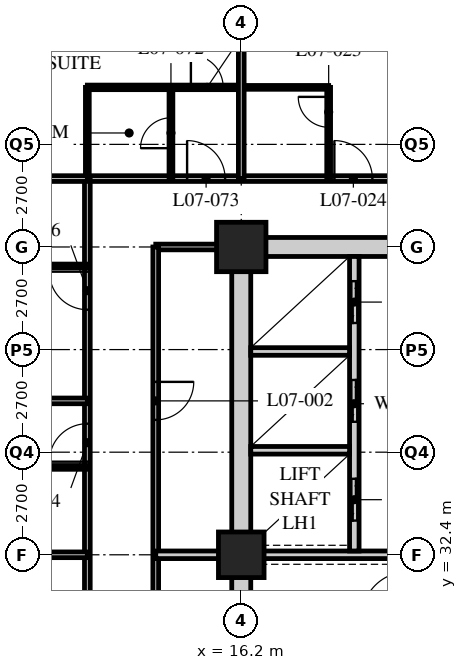
"""IFC4 building model, lengths in metres.
Left out: names, types, materials, properties, quantities, classifications, styles, units other than length and angle.
Written with IfcOpenShell. Run it as: python <this file> out.ifc"""

import sys

from ifc_helpers import new_model, si_unit, direction, frame, frame_2d, origin, origin_2d, place, context, subcontext, project, spatial, rectangle, hollow_rectangle, extrude, element, fill, save


model = new_model("IFC4")
c1 = context("Model", 3, precision=1e-05, world=origin(), true_north=direction((0.0, 1.0)))
c2 = subcontext(c1, "Body", "Model", "MODEL_VIEW")
j1 = project(units=[si_unit("LENGTHUNIT", "METRE"), si_unit("PLANEANGLEUNIT", "RADIAN")], contexts=[c1])
p1 = place(None, origin())
s1 = spatial("IfcSite", under=j1, at=p1, CompositionType="ELEMENT")
p2 = place(p1, origin())
s2 = spatial("IfcBuilding", under=s1, at=p2, CompositionType="ELEMENT")
p3 = place(p2, frame((0.0, 0.0, 36.4)))
s3 = spatial("IfcBuildingStorey", under=s2, at=p3, CompositionType="ELEMENT", Elevation=36.4)
p4 = place(p3, frame((16.2, 32.4, 0.0), z_axis=(0.0, 0.0, 1.0), x_axis=(1.0, 0.0, 0.0)))
e1 = element("IfcColumn", 1, at=p4, inside=s3, PredefinedType="COLUMN", context=c2, shape_type="SweptSolid", body=[
    extrude(hollow_rectangle(XDim=1.2, YDim=1.2, WallThickness=0.12, at=origin_2d()), origin(), (0.0, 0.0, 1.0), 3.4),
])
p5 = place(p3, frame((16.2, 40.5, 0.0), z_axis=(0.0, 0.0, 1.0), x_axis=(1.0, 0.0, 0.0)))
e2 = element("IfcColumn", 2, at=p5, inside=s3, PredefinedType="COLUMN", context=c2, shape_type="SweptSolid", body=[
    extrude(hollow_rectangle(XDim=1.3, YDim=1.3, WallThickness=0.13, at=origin_2d()), origin(), (0.0, 0.0, 1.0), 3.4),
])
p6 = place(p3, frame((12.15, 42.3, 0.0), z_axis=(0.0, 0.0, 1.0), x_axis=(1.0, 0.0, 0.0)))
e3 = element("IfcWall", 3, at=p6, inside=s3, PredefinedType="PARTITIONING", context=c2, shape_type="SweptSolid", body=[
    extrude(rectangle(XDim=32.4, YDim=0.15, at=frame_2d((16.2, 0.0))), origin(), (0.0, 0.0, 1.0), 3.19),
])
p7 = place(p6, frame((6.5, 0.0, 0.0)))
e4 = element("IfcOpeningElement", 4, at=p7, cuts=e3, PredefinedType="OPENING", context=c2, shape_type="SweptSolid", body=[
    extrude(rectangle(XDim=1.0, YDim=2.1, at=frame_2d((0.5, 1.05))), frame((0.0, 0.085, 0.0), z_axis=(0.0, -1.0, 0.0), x_axis=(1.0, 0.0, 0.0)), (0.0, 0.0, 1.0), 0.17),
])
p8 = place(p6, frame((8.4, 0.0, 0.0)))
e5 = element("IfcOpeningElement", 5, at=p8, cuts=e3, PredefinedType="OPENING", context=c2, shape_type="SweptSolid", body=[
    extrude(rectangle(XDim=1.0, YDim=2.1, at=frame_2d((0.5, 1.05))), frame((0.0, 0.085, 0.0), z_axis=(0.0, -1.0, 0.0), x_axis=(1.0, 0.0, 0.0)), (0.0, 0.0, 1.0), 0.17),
])
p9 = place(p6, frame((14.6, 0.0, 0.0)))
e6 = element("IfcOpeningElement", 6, at=p9, cuts=e3, PredefinedType="OPENING", context=c2, shape_type="SweptSolid", body=[
    extrude(rectangle(XDim=1.0, YDim=2.1, at=frame_2d((0.5, 1.05))), frame((0.0, 0.085, 0.0), z_axis=(0.0, -1.0, 0.0), x_axis=(1.0, 0.0, 0.0)), (0.0, 0.0, 1.0), 0.17),
])
p10 = place(p6, frame((18.65, 0.0, 0.0)))
e7 = element("IfcOpeningElement", 7, at=p10, cuts=e3, PredefinedType="OPENING", context=c2, shape_type="SweptSolid", body=[
    extrude(rectangle(XDim=1.0, YDim=2.1, at=frame_2d((0.5, 1.05))), frame((0.0, 0.085, 0.0), z_axis=(0.0, -1.0, 0.0), x_axis=(1.0, 0.0, 0.0)), (0.0, 0.0, 1.0), 0.17),
])
p11 = place(p6, frame((23.0, 0.0, 0.0)))
e8 = element("IfcOpeningElement", 8, at=p11, cuts=e3, PredefinedType="OPENING", context=c2, shape_type="SweptSolid", body=[
    extrude(rectangle(XDim=1.0, YDim=2.1, at=frame_2d((0.5, 1.05))), frame((0.0, 0.085, 0.0), z_axis=(0.0, -1.0, 0.0), x_axis=(1.0, 0.0, 0.0)), (0.0, 0.0, 1.0), 0.17),
])
p12 = place(p6, frame((26.75, 0.0, 0.0)))
e9 = element("IfcOpeningElement", 9, at=p12, cuts=e3, PredefinedType="OPENING", context=c2, shape_type="SweptSolid", body=[
    extrude(rectangle(XDim=1.0, YDim=2.1, at=frame_2d((0.5, 1.05))), frame((0.0, 0.085, 0.0), z_axis=(0.0, -1.0, 0.0), x_axis=(1.0, 0.0, 0.0)), (0.0, 0.0, 1.0), 0.17),
])
p13 = place(p6, frame((28.775, 0.0, 0.0)))
e10 = element("IfcOpeningElement", 10, at=p13, cuts=e3, PredefinedType="OPENING", context=c2, shape_type="SweptSolid", body=[
    extrude(rectangle(XDim=1.0, YDim=2.1, at=frame_2d((0.5, 1.05))), frame((0.0, 0.085, 0.0), z_axis=(0.0, -1.0, 0.0), x_axis=(1.0, 0.0, 0.0)), (0.0, 0.0, 1.0), 0.17),
])
p14 = place(p6, frame((2.625, 0.0, 0.0)))
e11 = element("IfcOpeningElement", 11, at=p14, cuts=e3, PredefinedType="OPENING", context=c2, shape_type="SweptSolid", body=[
    extrude(rectangle(XDim=1.0, YDim=2.1, at=frame_2d((0.5, 1.05))), frame((0.0, 0.085, 0.0), z_axis=(0.0, -1.0, 0.0), x_axis=(1.0, 0.0, 0.0)), (0.0, 0.0, 1.0), 0.17),
])
p15 = place(p3, frame((12.15, 16.2, 0.0), z_axis=(0.0, 0.0, 1.0), x_axis=(0.0, 1.0, 0.0)))
e12 = element("IfcWall", 12, at=p15, inside=s3, PredefinedType="PARTITIONING", context=c2, shape_type="SweptSolid", body=[
    extrude(rectangle(XDim=26.1, YDim=0.15, at=frame_2d((13.05, 0.0))), origin(), (0.0, 0.0, 1.0), 3.19),
])
p16 = place(p15, frame((2.75, 0.0, 0.0)))
e13 = element("IfcOpeningElement", 13, at=p16, cuts=e12, PredefinedType="OPENING", context=c2, shape_type="SweptSolid", body=[
    extrude(rectangle(XDim=1.0, YDim=2.1, at=frame_2d((0.5, 1.05))), frame((0.0, 0.085, 0.0), z_axis=(0.0, -1.0, 0.0), x_axis=(1.0, 0.0, 0.0)), (0.0, 0.0, 1.0), 0.17),
])
p17 = place(p15, frame((4.35, 0.0, 0.0)))
e14 = element("IfcOpeningElement", 14, at=p17, cuts=e12, PredefinedType="OPENING", context=c2, shape_type="SweptSolid", body=[
    extrude(rectangle(XDim=1.0, YDim=2.1, at=frame_2d((0.5, 1.05))), frame((0.0, 0.085, 0.0), z_axis=(0.0, -1.0, 0.0), x_axis=(1.0, 0.0, 0.0)), (0.0, 0.0, 1.0), 0.17),
])
p18 = place(p15, frame((10.55, 0.0, 0.0)))
e15 = element("IfcOpeningElement", 15, at=p18, cuts=e12, PredefinedType="OPENING", context=c2, shape_type="SweptSolid", body=[
    extrude(rectangle(XDim=1.0, YDim=2.1, at=frame_2d((0.5, 1.05))), frame((0.0, 0.085, 0.0), z_axis=(0.0, -1.0, 0.0), x_axis=(1.0, 0.0, 0.0)), (0.0, 0.0, 1.0), 0.17),
])
p19 = place(p15, frame((12.45, 0.0, 0.0)))
e16 = element("IfcOpeningElement", 16, at=p19, cuts=e12, PredefinedType="OPENING", context=c2, shape_type="SweptSolid", body=[
    extrude(rectangle(XDim=1.0, YDim=2.1, at=frame_2d((0.5, 1.05))), frame((0.0, 0.085, 0.0), z_axis=(0.0, -1.0, 0.0), x_axis=(1.0, 0.0, 0.0)), (0.0, 0.0, 1.0), 0.17),
])
p20 = place(p15, frame((18.65, 0.0, 0.0)))
e17 = element("IfcOpeningElement", 17, at=p20, cuts=e12, PredefinedType="OPENING", context=c2, shape_type="SweptSolid", body=[
    extrude(rectangle(XDim=1.0, YDim=2.1, at=frame_2d((0.5, 1.05))), frame((0.0, 0.085, 0.0), z_axis=(0.0, -1.0, 0.0), x_axis=(1.0, 0.0, 0.0)), (0.0, 0.0, 1.0), 0.17),
])
p21 = place(p15, frame((22.65, 0.0, 0.0)))
e18 = element("IfcOpeningElement", 18, at=p21, cuts=e12, PredefinedType="OPENING", context=c2, shape_type="SweptSolid", body=[
    extrude(rectangle(XDim=1.0, YDim=2.1, at=frame_2d((0.5, 1.05))), frame((0.0, 0.085, 0.0), z_axis=(0.0, -1.0, 0.0), x_axis=(1.0, 0.0, 0.0)), (0.0, 0.0, 1.0), 0.17),
])
p22 = place(p3, frame((16.0, 40.5, 0.0), z_axis=(0.0, 0.0, 1.0), x_axis=(-1.0, 0.0, 0.0)))
e19 = element("IfcWall", 19, at=p22, inside=s3, PredefinedType="PARTITIONING", context=c2, shape_type="SweptSolid", body=[
    extrude(rectangle(XDim=2.05, YDim=0.15, at=frame_2d((1.025, 0.0))), origin(), (0.0, 0.0, 1.0), 2.578),
])
p23 = place(p3, frame((13.95, 40.5, 0.0), z_axis=(0.0, 0.0, 1.0), x_axis=(0.0, -1.0, 0.0)))
e20 = element("IfcWall", 20, at=p23, inside=s3, PredefinedType="PARTITIONING", context=c2, shape_type="SweptSolid", body=[
    extrude(rectangle(XDim=22.5, YDim=0.15, at=frame_2d((11.25, 0.0))), origin(), (0.0, 0.0, 1.0), 3.19),
])
p24 = place(p23, frame((11.65, 0.0, 0.0)))
e21 = element("IfcOpeningElement", 21, at=p24, cuts=e20, PredefinedType="OPENING", context=c2, shape_type="SweptSolid", body=[
    extrude(rectangle(XDim=1.0, YDim=2.1, at=frame_2d((0.5, 1.05))), frame((0.0, 0.085, 0.0), z_axis=(0.0, -1.0, 0.0), x_axis=(1.0, 0.0, 0.0)), (0.0, 0.0, 1.0), 0.17),
])
p25 = place(p23, frame((3.55, 0.0, 0.0)))
e22 = element("IfcOpeningElement", 22, at=p25, cuts=e20, PredefinedType="OPENING", context=c2, shape_type="SweptSolid", body=[
    extrude(rectangle(XDim=1.0, YDim=2.1, at=frame_2d((0.5, 1.05))), frame((0.0, 0.085, 0.0), z_axis=(0.0, -1.0, 0.0), x_axis=(1.0, 0.0, 0.0)), (0.0, 0.0, 1.0), 0.17),
])
p26 = place(p3, frame((13.95, 32.4, 0.0), z_axis=(0.0, 0.0, 1.0), x_axis=(1.0, 0.0, 0.0)))
e23 = element("IfcWall", 23, at=p26, inside=s3, PredefinedType="SOLIDWALL", context=c2, shape_type="SweptSolid", body=[
    extrude(rectangle(XDim=2.25, YDim=0.2, at=frame_2d((1.125, 0.0))), origin(), (0.0, 0.0, 1.0), 2.578),
])
p27 = place(p3, frame((16.2, 44.7, 0.0), z_axis=(0.0, 0.0, 1.0), x_axis=(1.0, 0.0, 0.0)))
e24 = element("IfcWall", 24, at=p27, inside=s3, PredefinedType="PARTITIONING", context=c2, shape_type="SweptSolid", body=[
    extrude(rectangle(XDim=2.3, YDim=0.1, at=frame_2d((1.15, 0.0))), origin(), (0.0, 0.0, 1.0), 3.19),
])
p28 = place(p3, frame((18.5, 42.3, 0.0), z_axis=(0.0, 0.0, 1.0), x_axis=(0.0, 1.0, 0.0)))
e25 = element("IfcWall", 25, at=p28, inside=s3, PredefinedType="PARTITIONING", context=c2, shape_type="SweptSolid", body=[
    extrude(rectangle(XDim=2.4, YDim=0.1, at=frame_2d((1.2, 0.0))), origin(), (0.0, 0.0, 1.0), 3.19),
])
p29 = place(p28, frame((1.35, 0.0, 0.0)))
e26 = element("IfcOpeningElement", 26, at=p29, cuts=e25, PredefinedType="OPENING", context=c2, shape_type="SweptSolid", body=[
    extrude(rectangle(XDim=0.8, YDim=2.1, at=frame_2d((0.4, 1.05))), frame((0.0, 0.06, 0.0), z_axis=(0.0, -1.0, 0.0), x_axis=(1.0, 0.0, 0.0)), (0.0, 0.0, 1.0), 0.12),
])
p30 = place(p3, frame((12.15, 32.4, 0.0), z_axis=(0.0, 0.0, 1.0), x_axis=(-1.0, 0.0, 0.0)))
e27 = element("IfcWall", 27, at=p30, inside=s3, PredefinedType="PARTITIONING", context=c2, shape_type="SweptSolid", body=[
    extrude(rectangle(XDim=11.85, YDim=0.15, at=frame_2d((5.925, 0.0))), origin(), (0.0, 0.0, 1.0), 2.578),
])
p31 = place(p3, frame((12.15, 34.7, 0.0), z_axis=(0.0, 0.0, 1.0), x_axis=(-1.0, 0.0, 0.0)))
e28 = element("IfcWall", 28, at=p31, inside=s3, PredefinedType="PARTITIONING", context=c2, shape_type="SweptSolid", body=[
    extrude(rectangle(XDim=3.0, YDim=0.1, at=frame_2d((1.5, 0.0))), origin(), (0.0, 0.0, 1.0), 3.19),
])
p32 = place(p31, frame((1.95, 0.0, 0.0)))
e29 = element("IfcOpeningElement", 29, at=p32, cuts=e28, PredefinedType="OPENING", context=c2, shape_type="SweptSolid", body=[
    extrude(rectangle(XDim=0.8, YDim=2.1, at=frame_2d((0.4, 1.05))), frame((0.0, 0.06, 0.0), z_axis=(0.0, -1.0, 0.0), x_axis=(1.0, 0.0, 0.0)), (0.0, 0.0, 1.0), 0.12),
])
p33 = place(p3, frame((12.15, 36.45, 0.0), z_axis=(0.0, 0.0, 1.0), x_axis=(-1.0, 0.0, 0.0)))
e30 = element("IfcWall", 30, at=p33, inside=s3, PredefinedType="PARTITIONING", context=c2, shape_type="SweptSolid", body=[
    extrude(rectangle(XDim=11.85, YDim=0.15, at=frame_2d((5.925, 0.0))), origin(), (0.0, 0.0, 1.0), 3.19),
])
p34 = place(p3, frame((12.15, 40.0, 0.0), z_axis=(0.0, 0.0, 1.0), x_axis=(-1.0, 0.0, 0.0)))
e31 = element("IfcWall", 31, at=p34, inside=s3, PredefinedType="PARTITIONING", context=c2, shape_type="SweptSolid", body=[
    extrude(rectangle(XDim=3.515, YDim=0.1, at=frame_2d((1.757, 0.0))), origin(), (0.0, 0.0, 1.0), 3.19),
])
p35 = place(p34, frame((1.965, 0.0, 0.0)))
e32 = element("IfcOpeningElement", 32, at=p35, cuts=e31, PredefinedType="OPENING", context=c2, shape_type="SweptSolid", body=[
    extrude(rectangle(XDim=0.8, YDim=2.1, at=frame_2d((0.4, 1.05))), frame((0.0, 0.06, 0.0), z_axis=(0.0, -1.0, 0.0), x_axis=(1.0, 0.0, 0.0)), (0.0, 0.0, 1.0), 0.12),
])
p36 = place(p3, frame((12.15, 44.7, 0.0), z_axis=(0.0, 0.0, 1.0), x_axis=(1.0, 0.0, 0.0)))
e33 = element("IfcWall", 33, at=p36, inside=s3, PredefinedType="PARTITIONING", context=c2, shape_type="SweptSolid", body=[
    extrude(rectangle(XDim=4.05, YDim=0.12, at=frame_2d((2.025, 0.0))), origin(), (0.0, 0.0, 1.0), 3.19),
])
p37 = place(p36, frame((2.725, 0.0, 0.0)))
e34 = element("IfcOpeningElement", 34, at=p37, cuts=e33, PredefinedType="OPENING", context=c2, shape_type="SweptSolid", body=[
    extrude(rectangle(XDim=0.85, YDim=2.1, at=frame_2d((0.425, 1.05))), frame((0.0, 0.07, 0.0), z_axis=(0.0, -1.0, 0.0), x_axis=(1.0, 0.0, 0.0)), (0.0, 0.0, 1.0), 0.14),
])
p38 = place(p3, frame((14.35, 42.3, 0.0), z_axis=(0.0, 0.0, 1.0), x_axis=(0.0, 1.0, 0.0)))
e35 = element("IfcWall", 35, at=p38, inside=s3, PredefinedType="PARTITIONING", context=c2, shape_type="SweptSolid", body=[
    extrude(rectangle(XDim=2.4, YDim=0.1, at=frame_2d((1.2, 0.0))), origin(), (0.0, 0.0, 1.0), 3.19),
])
p39 = place(p38, frame((0.8, 0.0, 0.0)))
e36 = element("IfcOpeningElement", 36, at=p39, cuts=e35, PredefinedType="OPENING", context=c2, shape_type="SweptSolid", body=[
    extrude(rectangle(XDim=0.8, YDim=2.1, at=frame_2d((0.4, 1.05))), frame((0.0, 0.06, 0.0), z_axis=(0.0, -1.0, 0.0), x_axis=(1.0, 0.0, 0.0)), (0.0, 0.0, 1.0), 0.12),
])
p40 = place(p3, frame((12.15, 42.3, 0.0), z_axis=(0.0, 0.0, 1.0), x_axis=(0.0, 1.0, 0.0)))
e37 = element("IfcWall", 37, at=p40, inside=s3, PredefinedType="PARTITIONING", context=c2, shape_type="SweptSolid", body=[
    extrude(rectangle(XDim=2.4, YDim=0.1, at=frame_2d((1.2, 0.0))), origin(), (0.0, 0.0, 1.0), 3.19),
])
p41 = place(p3, frame((4.35, 42.3, 0.0), z_axis=(0.0, 0.0, 1.0), x_axis=(1.0, 0.0, 0.0)))
e38 = element("IfcWall", 38, at=p41, inside=s3, PredefinedType="PARTITIONING", context=c2, shape_type="SweptSolid", body=[
    extrude(rectangle(XDim=7.8, YDim=0.15, at=frame_2d((3.9, 0.0))), origin(), (0.0, 0.0, 1.0), 3.19),
])
p42 = place(p3, frame((16.2, 42.3, 0.0), z_axis=(0.0, 0.0, 1.0), x_axis=(0.0, 1.0, 0.0)))
e39 = element("IfcWall", 39, at=p42, inside=s3, PredefinedType="PARTITIONING", context=c2, shape_type="SweptSolid", body=[
    extrude(rectangle(XDim=6.0, YDim=0.15, at=frame_2d((3.0, 0.0))), origin(), (0.0, 0.0, 1.0), 2.578),
])
p43 = place(p3, frame((15.95, 40.5, 0.0), z_axis=(0.0, 0.0, 1.0), x_axis=(1.0, 0.0, 0.0)))
e40 = element("IfcWall", 40, at=p43, inside=s3, PredefinedType="SOLIDWALL", context=c2, shape_type="SweptSolid", body=[
    extrude(rectangle(XDim=24.8, YDim=0.5, at=frame_2d((12.4, 0.0))), origin(), (0.0, 0.0, 1.0), 2.54),
])
p44 = place(p43, frame((11.5, 0.0, 0.0)))
e41 = element("IfcOpeningElement", 41, at=p44, cuts=e40, PredefinedType="OPENING", context=c2, shape_type="SweptSolid", body=[
    extrude(rectangle(XDim=1.8, YDim=2.4, at=frame_2d((0.9, 1.2))), frame((0.0, 0.26, 0.0), z_axis=(0.0, -1.0, 0.0), x_axis=(1.0, 0.0, 0.0)), (0.0, 0.0, 1.0), 0.52),
])
p45 = place(p3, frame((16.2, 24.55, 0.0), z_axis=(0.0, 0.0, 1.0), x_axis=(0.0, 1.0, 0.0)))
e42 = element("IfcWall", 42, at=p45, inside=s3, PredefinedType="SOLIDWALL", context=c2, shape_type="SweptSolid", body=[
    extrude(rectangle(XDim=15.7, YDim=0.5, at=frame_2d((7.85, 0.0))), origin(), (0.0, 0.0, 1.0), 2.578),
])
p46 = place(p3, frame((16.45, 32.4, 0.0), z_axis=(0.0, 0.0, 1.0), x_axis=(1.0, 0.0, 0.0)))
e43 = element("IfcWall", 43, at=p46, inside=s3, PredefinedType="SOLIDWALL", context=c2, shape_type="SweptSolid", body=[
    extrude(rectangle(XDim=7.95, YDim=0.2, at=frame_2d((3.975, 0.0))), origin(), (0.0, 0.0, 1.0), 2.578),
])
p47 = place(p3, frame((19.175, 32.5, 0.0), z_axis=(0.0, 0.0, 1.0), x_axis=(0.0, 1.0, 0.0)))
e44 = element("IfcWall", 44, at=p47, inside=s3, PredefinedType="SOLIDWALL", context=c2, shape_type="SweptSolid", body=[
    extrude(rectangle(XDim=7.75, YDim=0.25, at=frame_2d((3.875, 0.0))), origin(), (0.0, 0.0, 1.0), 3.19),
])
p48 = place(p47, frame((0.8, 0.0, 0.0)))
e45 = element("IfcOpeningElement", 45, at=p48, cuts=e44, PredefinedType="OPENING", context=c2, shape_type="SweptSolid", body=[
    extrude(rectangle(XDim=1.1, YDim=2.4, at=frame_2d((0.55, 1.2))), frame((0.0, 0.135, 0.0), z_axis=(0.0, -1.0, 0.0), x_axis=(1.0, 0.0, 0.0)), (0.0, 0.0, 1.0), 0.27),
])
p49 = place(p47, frame((3.4, 0.0, 0.0)))
e46 = element("IfcOpeningElement", 46, at=p49, cuts=e44, PredefinedType="OPENING", context=c2, shape_type="SweptSolid", body=[
    extrude(rectangle(XDim=1.1, YDim=2.4, at=frame_2d((0.55, 1.2))), frame((0.0, 0.135, 0.0), z_axis=(0.0, -1.0, 0.0), x_axis=(1.0, 0.0, 0.0)), (0.0, 0.0, 1.0), 0.27),
])
p50 = place(p47, frame((6.0, 0.0, 0.0)))
e47 = element("IfcOpeningElement", 47, at=p50, cuts=e44, PredefinedType="OPENING", context=c2, shape_type="SweptSolid", body=[
    extrude(rectangle(XDim=1.1, YDim=2.4, at=frame_2d((0.55, 1.2))), frame((0.0, 0.135, 0.0), z_axis=(0.0, -1.0, 0.0), x_axis=(1.0, 0.0, 0.0)), (0.0, 0.0, 1.0), 0.27),
])
for number, where, z_axis, x_axis in (
    (48, (16.45, 35.15, 0.0), (0.0, 0.0, 1.0), (1.0, 0.0, 0.0)),
    (49, (16.45, 37.75, 0.0), (0.0, 0.0, 1.0), (1.0, 0.0, 0.0)),
):
    element("IfcWall", number, at=place(p3, frame(where, z_axis=z_axis, x_axis=x_axis)), inside=s3, PredefinedType="SOLIDWALL", context=c2, shape_type="SweptSolid", body=[
        extrude(rectangle(XDim=2.6, YDim=0.2, at=frame_2d((1.3, 0.0))), origin(), (0.0, 0.0, 1.0), 3.19),
    ])
p51 = place(p25, origin())
e50 = element("IfcDoor", 50, at=p51, inside=s3, OperationType="SINGLE_SWING_LEFT", PredefinedType="DOOR", context=c2, shape_type="SweptSolid", body=[
    extrude(rectangle(XDim=1.0, YDim=2.1, at=frame_2d((0.5, 1.05))), frame((0.0, 0.025, 0.0), z_axis=(0.0, -1.0, 0.0), x_axis=(1.0, 0.0, 0.0)), (0.0, 0.0, 1.0), 0.05),
])
fill(e22, e50)
p52 = place(p29, origin())
e51 = element("IfcDoor", 51, at=p52, inside=s3, OperationType="SINGLE_SWING_RIGHT", PredefinedType="DOOR", context=c2, shape_type="SweptSolid", body=[
    extrude(rectangle(XDim=0.8, YDim=2.1, at=frame_2d((0.4, 1.05))), frame((0.0, 0.025, 0.0), z_axis=(0.0, -1.0, 0.0), x_axis=(1.0, 0.0, 0.0)), (0.0, 0.0, 1.0), 0.05),
])
fill(e26, e51)
p53 = place(p7, origin())
e52 = element("IfcDoor", 52, at=p53, inside=s3, OperationType="SINGLE_SWING_LEFT", PredefinedType="DOOR", context=c2, shape_type="SweptSolid", body=[
    extrude(rectangle(XDim=1.0, YDim=2.1, at=frame_2d((0.5, 1.05))), frame((0.0, 0.025, 0.0), z_axis=(0.0, -1.0, 0.0), x_axis=(1.0, 0.0, 0.0)), (0.0, 0.0, 1.0), 0.05),
])
fill(e4, e52)
p54 = place(p20, origin())
e53 = element("IfcDoor", 53, at=p54, inside=s3, OperationType="SINGLE_SWING_LEFT", PredefinedType="DOOR", context=c2, shape_type="SweptSolid", body=[
    extrude(rectangle(XDim=1.0, YDim=2.1, at=frame_2d((0.5, 1.05))), frame((0.0, 0.025, 0.0), z_axis=(0.0, -1.0, 0.0), x_axis=(1.0, 0.0, 0.0)), (0.0, 0.0, 1.0), 0.05),
])
fill(e17, e53)
p55 = place(p21, origin())
e54 = element("IfcDoor", 54, at=p55, inside=s3, OperationType="SINGLE_SWING_RIGHT", PredefinedType="DOOR", context=c2, shape_type="SweptSolid", body=[
    extrude(rectangle(XDim=1.0, YDim=2.1, at=frame_2d((0.5, 1.05))), frame((0.0, 0.025, 0.0), z_axis=(0.0, -1.0, 0.0), x_axis=(1.0, 0.0, 0.0)), (0.0, 0.0, 1.0), 0.05),
])
fill(e18, e54)
p56 = place(p39, origin())
e55 = element("IfcDoor", 55, at=p56, inside=s3, OperationType="SINGLE_SWING_LEFT", PredefinedType="DOOR", context=c2, shape_type="SweptSolid", body=[
    extrude(rectangle(XDim=0.8, YDim=2.1, at=frame_2d((0.4, 1.05))), frame((0.0, 0.025, 0.0), z_axis=(0.0, -1.0, 0.0), x_axis=(1.0, 0.0, 0.0)), (0.0, 0.0, 1.0), 0.05),
])
fill(e36, e55)
p57 = place(p14, origin())
e56 = element("IfcDoor", 56, at=p57, inside=s3, OperationType="SINGLE_SWING_LEFT", PredefinedType="DOOR", context=c2, shape_type="SweptSolid", body=[
    extrude(rectangle(XDim=1.0, YDim=2.1, at=frame_2d((0.5, 1.05))), frame((0.0, 0.025, 0.0), z_axis=(0.0, -1.0, 0.0), x_axis=(1.0, 0.0, 0.0)), (0.0, 0.0, 1.0), 0.05),
])
fill(e11, e56)
p58 = place(p37, origin())
e57 = element("IfcDoor", 57, at=p58, inside=s3, OperationType="SINGLE_SWING_LEFT", PredefinedType="DOOR", context=c2, shape_type="SweptSolid", body=[
    extrude(rectangle(XDim=0.85, YDim=2.1, at=frame_2d((0.425, 1.05))), frame((0.0, 0.025, 0.0), z_axis=(0.0, -1.0, 0.0), x_axis=(1.0, 0.0, 0.0)), (0.0, 0.0, 1.0), 0.05),
])
fill(e34, e57)
p59 = place(p48, origin())
e58 = element("IfcDoor", 58, at=p59, inside=s3, OperationType="DOUBLE_DOOR_SLIDING", PredefinedType="DOOR", context=c2, shape_type="SweptSolid", body=[
    extrude(rectangle(XDim=1.1, YDim=2.4, at=frame_2d((0.55, 1.2))), frame((0.0, 0.025, 0.0), z_axis=(0.0, -1.0, 0.0), x_axis=(1.0, 0.0, 0.0)), (0.0, 0.0, 1.0), 0.05),
])
fill(e45, e58)
p60 = place(p49, origin())
e59 = element("IfcDoor", 59, at=p60, inside=s3, OperationType="DOUBLE_DOOR_SLIDING", PredefinedType="DOOR", context=c2, shape_type="SweptSolid", body=[
    extrude(rectangle(XDim=1.1, YDim=2.4, at=frame_2d((0.55, 1.2))), frame((0.0, 0.025, 0.0), z_axis=(0.0, -1.0, 0.0), x_axis=(1.0, 0.0, 0.0)), (0.0, 0.0, 1.0), 0.05),
])
fill(e46, e59)
p61 = place(p50, origin())
e60 = element("IfcDoor", 60, at=p61, inside=s3, OperationType="DOUBLE_DOOR_SLIDING", PredefinedType="DOOR", context=c2, shape_type="SweptSolid", body=[
    extrude(rectangle(XDim=1.1, YDim=2.4, at=frame_2d((0.55, 1.2))), frame((0.0, 0.025, 0.0), z_axis=(0.0, -1.0, 0.0), x_axis=(1.0, 0.0, 0.0)), (0.0, 0.0, 1.0), 0.05),
])
fill(e47, e60)
save(model, sys.argv[1])
